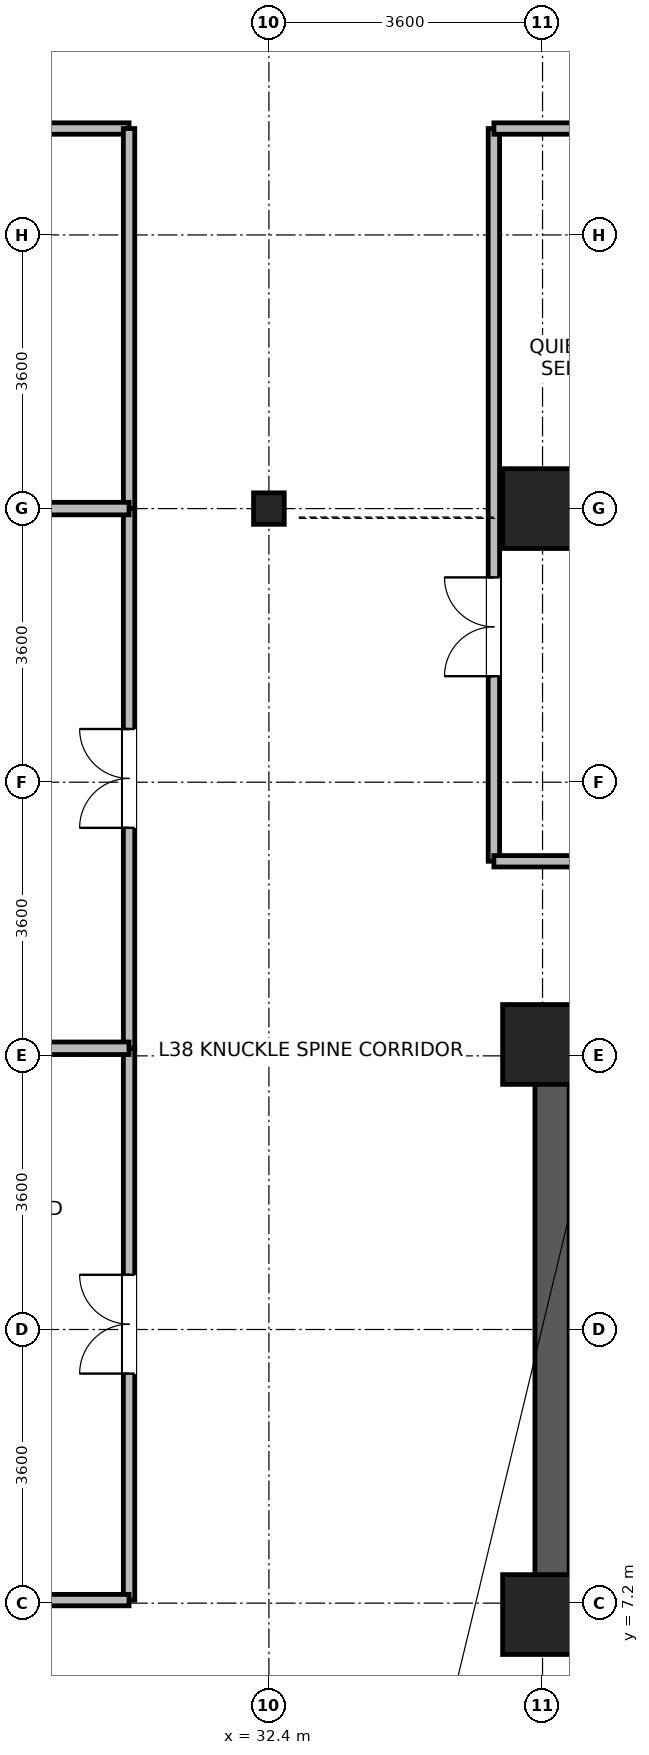
"""IFC4 building model, lengths in metres.
Left out: names, types, materials, properties, quantities, classifications, styles, units other than length and angle.
Written with IfcOpenShell. Run it as: python <this file> out.ifc"""

import sys

from ifc_helpers import new_model, si_unit, direction, frame, frame_2d, origin, origin_2d, place, context, subcontext, project, spatial, rectangle, i_section, extrude, source, transform, mapped, element, fill, save


model = new_model("IFC4")
c1 = context("Model", 3, precision=1e-05, world=origin(), true_north=direction((0.0, 1.0)))
c2 = subcontext(c1, "Body", "Model", "MODEL_VIEW")
j1 = project(units=[si_unit("LENGTHUNIT", "METRE"), si_unit("PLANEANGLEUNIT", "RADIAN")], contexts=[c1])
p1 = place(None, origin())
s1 = spatial("IfcSite", under=j1, at=p1, CompositionType="ELEMENT")
p2 = place(p1, origin())
s2 = spatial("IfcBuilding", under=s1, at=p2, CompositionType="ELEMENT")
p3 = place(p2, frame((0.0, 0.0, 151.3)))
s3 = spatial("IfcBuildingStorey", under=s2, at=p3, CompositionType="ELEMENT", Elevation=151.3)
p4 = place(p3, frame((36.125, 6.85, 0.0), z_axis=(0.0, 0.0, 1.0), x_axis=(0.0, 1.0, 0.0)))
e1 = element("IfcWall", 1, at=p4, inside=s3, PredefinedType="SHEAR", context=c2, shape_type="SweptSolid", body=[
    extrude(rectangle(XDim=7.9, YDim=0.45, at=frame_2d((3.95, 0.0))), origin(), (0.0, 0.0, 1.0), 3.46),
])
m1 = source(origin(), c2, "Body", "SweptSolid", [
    extrude(rectangle(XDim=1.05, YDim=1.05, at=origin_2d()), origin(), (0.0, 0.0, 1.0), 3.7),
])
for number, where, z_axis, x_axis in (
    (2, (36.0, 21.6, 0.0), (0.0, 0.0, 1.0), (1.0, 0.0, 0.0)),
    (3, (36.0, 7.05, 0.0), (0.0, 0.0, 1.0), (1.0, 0.0, 0.0)),
    (4, (36.0, 14.55, 0.0), (0.0, 0.0, 1.0), (1.0, 0.0, 0.0)),
):
    element("IfcColumn", number, at=place(p3, frame(where, z_axis=z_axis, x_axis=x_axis)), inside=s3, PredefinedType="COLUMN", context=c2, shape_type="MappedRepresentation", body=[
        mapped(m1, transform((0.0, 0.0, 0.0), x_axis=(1.0, 0.0, 0.0), y_axis=(0.0, 1.0, 0.0), z_axis=(0.0, 0.0, 1.0), scale=1.0)),
    ])
m2 = source(origin(), c2, "Body", "SweptSolid", [
    extrude(i_section(OverallWidth=0.404, OverallDepth=0.414, WebThickness=0.021, FlangeThickness=0.028, FilletRadius=0.015, at=origin_2d()), origin(), (0.0, 0.0, 1.0), 3.7),
])
p5 = place(p3, frame((32.4, 21.6, 0.0), z_axis=(0.0, 0.0, 1.0), x_axis=(1.0, 0.0, 0.0)))
e5 = element("IfcColumn", 5, at=p5, inside=s3, PredefinedType="COLUMN", context=c2, shape_type="MappedRepresentation", body=[
    mapped(m2, transform((0.0, 0.0, 0.0), x_axis=(1.0, 0.0, 0.0), y_axis=(0.0, 1.0, 0.0), z_axis=(0.0, 0.0, 1.0), scale=1.0)),
])
p6 = place(p3, frame((19.22, 26.6, 0.0), z_axis=(0.0, 0.0, 1.0), x_axis=(1.0, 0.0, 0.0)))
e6 = element("IfcWall", 6, at=p6, inside=s3, PredefinedType="PARTITIONING", context=c2, shape_type="SweptSolid", body=[
    extrude(rectangle(XDim=11.34, YDim=0.15, at=frame_2d((5.67, 0.0))), origin(), (0.0, 0.0, 1.0), 3.44),
])
p7 = place(p6, frame((5.02, 0.0, 0.0)))
e7 = element("IfcOpeningElement", 7, at=p7, cuts=e6, PredefinedType="OPENING", context=c2, shape_type="SweptSolid", body=[
    extrude(rectangle(XDim=1.3, YDim=2.12, at=frame_2d((0.65, 1.06))), frame((0.0, 0.085, 0.0), z_axis=(0.0, -1.0, 0.0), x_axis=(1.0, 0.0, 0.0)), (0.0, 0.0, 1.0), 0.17),
])
p8 = place(p3, frame((35.36, 16.96, 0.0), z_axis=(0.0, 0.0, 1.0), x_axis=(0.0, 1.0, 0.0)))
e8 = element("IfcWall", 8, at=p8, inside=s3, PredefinedType="PARTITIONING", context=c2, shape_type="SweptSolid", body=[
    extrude(rectangle(XDim=9.64, YDim=0.15, at=frame_2d((4.82, 0.0))), origin(), (0.0, 0.0, 1.0), 3.44),
])
p9 = place(p8, frame((2.435, 0.0, 0.0)))
e9 = element("IfcOpeningElement", 9, at=p9, cuts=e8, PredefinedType="OPENING", context=c2, shape_type="SweptSolid", body=[
    extrude(rectangle(XDim=1.3, YDim=2.12, at=frame_2d((0.65, 1.06))), frame((0.0, 0.085, 0.0), z_axis=(0.0, -1.0, 0.0), x_axis=(1.0, 0.0, 0.0)), (0.0, 0.0, 1.0), 0.17),
])
p10 = place(p3, frame((30.56, 7.24, 0.0), z_axis=(0.0, 0.0, 1.0), x_axis=(0.0, 1.0, 0.0)))
e10 = element("IfcWall", 10, at=p10, inside=s3, PredefinedType="PARTITIONING", context=c2, shape_type="SweptSolid", body=[
    extrude(rectangle(XDim=7.26, YDim=0.15, at=frame_2d((3.63, 0.0))), origin(), (0.0, 0.0, 1.0), 3.44),
])
p11 = place(p10, frame((2.98, 0.0, 0.0)))
e11 = element("IfcOpeningElement", 11, at=p11, cuts=e10, PredefinedType="OPENING", context=c2, shape_type="SweptSolid", body=[
    extrude(rectangle(XDim=1.3, YDim=2.12, at=frame_2d((0.65, 1.06))), frame((0.0, 0.085, 0.0), z_axis=(0.0, -1.0, 0.0), x_axis=(1.0, 0.0, 0.0)), (0.0, 0.0, 1.0), 0.17),
])
p12 = place(p3, frame((30.56, 14.5, 0.0), z_axis=(0.0, 0.0, 1.0), x_axis=(0.0, 1.0, 0.0)))
e12 = element("IfcWall", 12, at=p12, inside=s3, PredefinedType="PARTITIONING", context=c2, shape_type="SweptSolid", body=[
    extrude(rectangle(XDim=7.1, YDim=0.15, at=frame_2d((3.55, 0.0))), origin(), (0.0, 0.0, 1.0), 3.44),
])
p13 = place(p12, frame((2.9, 0.0, 0.0)))
e13 = element("IfcOpeningElement", 13, at=p13, cuts=e12, PredefinedType="OPENING", context=c2, shape_type="SweptSolid", body=[
    extrude(rectangle(XDim=1.3, YDim=2.12, at=frame_2d((0.65, 1.06))), frame((0.0, 0.085, 0.0), z_axis=(0.0, -1.0, 0.0), x_axis=(1.0, 0.0, 0.0)), (0.0, 0.0, 1.0), 0.17),
])
p14 = place(p3, frame((30.56, 21.6, 0.0), z_axis=(0.0, 0.0, 1.0), x_axis=(0.0, 1.0, 0.0)))
e14 = element("IfcWall", 14, at=p14, inside=s3, PredefinedType="PARTITIONING", context=c2, shape_type="SweptSolid", body=[
    extrude(rectangle(XDim=5.0, YDim=0.15, at=frame_2d((2.5, 0.0))), origin(), (0.0, 0.0, 1.0), 3.44),
])
p15 = place(p3, frame((25.832, 7.24, 0.0), z_axis=(0.0, 0.0, 1.0), x_axis=(1.0, 0.0, 0.0)))
e15 = element("IfcWall", 15, at=p15, inside=s3, PredefinedType="PARTITIONING", context=c2, shape_type="SweptSolid", body=[
    extrude(rectangle(XDim=4.728, YDim=0.15, at=frame_2d((2.364, 0.0))), origin(), (0.0, 0.0, 1.0), 3.44),
])
for number, where, z_axis, x_axis in (
    (16, (35.36, 16.96, 0.0), (0.0, 0.0, 1.0), (1.0, 0.0, 0.0)),
    (17, (35.36, 26.6, 0.0), (0.0, 0.0, 1.0), (1.0, 0.0, 0.0)),
):
    element("IfcWall", number, at=place(p3, frame(where, z_axis=z_axis, x_axis=x_axis)), inside=s3, PredefinedType="PARTITIONING", context=c2, shape_type="SweptSolid", body=[
        extrude(rectangle(XDim=3.28, YDim=0.15, at=frame_2d((1.64, 0.0))), origin(), (0.0, 0.0, 1.0), 3.44),
    ])
p16 = place(p3, frame((25.832, 14.5, 0.0), z_axis=(0.0, 0.0, 1.0), x_axis=(1.0, 0.0, 0.0)))
e18 = element("IfcWall", 18, at=p16, inside=s3, PredefinedType="PARTITIONING", context=c2, shape_type="SweptSolid", body=[
    extrude(rectangle(XDim=4.728, YDim=0.165, at=frame_2d((2.364, 0.0))), origin(), (0.0, 0.0, 1.0), 3.44),
])
p17 = place(p3, frame((25.832, 21.6, 0.0), z_axis=(0.0, 0.0, 1.0), x_axis=(1.0, 0.0, 0.0)))
e19 = element("IfcWall", 19, at=p17, inside=s3, PredefinedType="PARTITIONING", context=c2, shape_type="SweptSolid", body=[
    extrude(rectangle(XDim=4.728, YDim=0.165, at=frame_2d((2.364, 0.0))), origin(), (0.0, 0.0, 1.0), 2.99),
])
p18 = place(p9, origin())
e20 = element("IfcDoor", 20, at=p18, inside=s3, OperationType="DOUBLE_DOOR_SINGLE_SWING", PredefinedType="DOOR", context=c2, shape_type="SweptSolid", body=[
    extrude(rectangle(XDim=1.3, YDim=2.12, at=frame_2d((0.65, 1.06))), frame((0.0, 0.025, 0.0), z_axis=(0.0, -1.0, 0.0), x_axis=(1.0, 0.0, 0.0)), (0.0, 0.0, 1.0), 0.05),
])
fill(e9, e20)
p19 = place(p11, origin())
e21 = element("IfcDoor", 21, at=p19, inside=s3, OperationType="DOUBLE_DOOR_SINGLE_SWING", PredefinedType="DOOR", context=c2, shape_type="SweptSolid", body=[
    extrude(rectangle(XDim=1.3, YDim=2.12, at=frame_2d((0.65, 1.06))), frame((0.0, 0.025, 0.0), z_axis=(0.0, -1.0, 0.0), x_axis=(1.0, 0.0, 0.0)), (0.0, 0.0, 1.0), 0.05),
])
fill(e11, e21)
p20 = place(p13, origin())
e22 = element("IfcDoor", 22, at=p20, inside=s3, OperationType="DOUBLE_DOOR_SINGLE_SWING", PredefinedType="DOOR", context=c2, shape_type="SweptSolid", body=[
    extrude(rectangle(XDim=1.3, YDim=2.12, at=frame_2d((0.65, 1.06))), frame((0.0, 0.025, 0.0), z_axis=(0.0, -1.0, 0.0), x_axis=(1.0, 0.0, 0.0)), (0.0, 0.0, 1.0), 0.05),
])
fill(e13, e22)
save(model, sys.argv[1])
